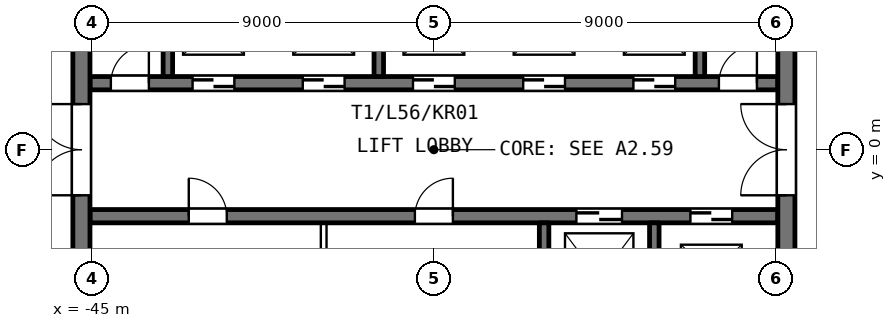
"""IFC4 building model, lengths in metres.
Left out: names, types, materials, properties, quantities, classifications, styles, units other than length and angle.
Written with IfcOpenShell. Run it as: python <this file> out.ifc"""

import sys

from ifc_helpers import new_model, si_unit, direction, frame, frame_2d, origin, place, context, subcontext, project, spatial, rectangle, extrude, element, fill, save


model = new_model("IFC4")
c1 = context("Model", 3, precision=1e-05, world=origin(), true_north=direction((0.0, 1.0)))
c2 = subcontext(c1, "Body", "Model", "MODEL_VIEW")
j1 = project(units=[si_unit("LENGTHUNIT", "METRE"), si_unit("PLANEANGLEUNIT", "RADIAN")], contexts=[c1])
p1 = place(None, origin())
s1 = spatial("IfcSite", under=j1, at=p1, CompositionType="ELEMENT")
p2 = place(p1, origin())
s2 = spatial("IfcBuilding", under=s1, at=p2, CompositionType="ELEMENT")
p3 = place(p2, frame((0.0, 0.0, 236.7)))
s3 = spatial("IfcBuildingStorey", under=s2, at=p3, CompositionType="ELEMENT", Elevation=236.7)
p4 = place(p3, frame((-45.05, -1.75, 0.0), z_axis=(0.0, 0.0, 1.0), x_axis=(1.0, 0.0, 0.0)))
e1 = element("IfcWall", 1, at=p4, inside=s3, PredefinedType="SHEAR", context=c2, shape_type="SweptSolid", body=[
    extrude(rectangle(XDim=18.1, YDim=0.35, at=frame_2d((9.05, 0.0))), origin(), (0.0, 0.0, 1.0), 3.6),
])
p5 = place(p4, frame((12.8, 0.0, 0.0)))
e2 = element("IfcOpeningElement", 2, at=p5, cuts=e1, PredefinedType="OPENING", context=c2, shape_type="SweptSolid", body=[
    extrude(rectangle(XDim=1.2, YDim=2.1, at=frame_2d((0.6, 1.05))), frame((0.0, 0.185, 0.0), z_axis=(0.0, -1.0, 0.0), x_axis=(1.0, 0.0, 0.0)), (0.0, 0.0, 1.0), 0.37),
])
p6 = place(p4, frame((15.8, 0.0, 0.0)))
e3 = element("IfcOpeningElement", 3, at=p6, cuts=e1, PredefinedType="OPENING", context=c2, shape_type="SweptSolid", body=[
    extrude(rectangle(XDim=1.1, YDim=2.1, at=frame_2d((0.55, 1.05))), frame((0.0, 0.185, 0.0), z_axis=(0.0, -1.0, 0.0), x_axis=(1.0, 0.0, 0.0)), (0.0, 0.0, 1.0), 0.37),
])
p7 = place(p4, frame((2.6, 0.0, 0.0)))
e4 = element("IfcOpeningElement", 4, at=p7, cuts=e1, PredefinedType="OPENING", context=c2, shape_type="SweptSolid", body=[
    extrude(rectangle(XDim=1.0, YDim=2.1, at=frame_2d((0.5, 1.05))), frame((0.0, 0.185, 0.0), z_axis=(0.0, -1.0, 0.0), x_axis=(1.0, 0.0, 0.0)), (0.0, 0.0, 1.0), 0.37),
])
p8 = place(p4, frame((8.55, 0.0, 0.0)))
e5 = element("IfcOpeningElement", 5, at=p8, cuts=e1, PredefinedType="OPENING", context=c2, shape_type="SweptSolid", body=[
    extrude(rectangle(XDim=1.0, YDim=2.1, at=frame_2d((0.5, 1.05))), frame((0.0, 0.185, 0.0), z_axis=(0.0, -1.0, 0.0), x_axis=(1.0, 0.0, 0.0)), (0.0, 0.0, 1.0), 0.37),
])
p9 = place(p3, frame((-45.05, 1.75, 0.0), z_axis=(0.0, 0.0, 1.0), x_axis=(1.0, 0.0, 0.0)))
e6 = element("IfcWall", 6, at=p9, inside=s3, PredefinedType="SHEAR", context=c2, shape_type="SweptSolid", body=[
    extrude(rectangle(XDim=18.1, YDim=0.35, at=frame_2d((9.05, 0.0))), origin(), (0.0, 0.0, 1.0), 3.6),
])
p10 = place(p9, frame((0.55, 0.0, 0.0)))
e7 = element("IfcOpeningElement", 7, at=p10, cuts=e6, PredefinedType="OPENING", context=c2, shape_type="SweptSolid", body=[
    extrude(rectangle(XDim=1.0, YDim=2.1, at=frame_2d((0.5, 1.05))), frame((0.0, 0.185, 0.0), z_axis=(0.0, -1.0, 0.0), x_axis=(1.0, 0.0, 0.0)), (0.0, 0.0, 1.0), 0.37),
])
p11 = place(p9, frame((2.7, 0.0, 0.0)))
e8 = element("IfcOpeningElement", 8, at=p11, cuts=e6, PredefinedType="OPENING", context=c2, shape_type="SweptSolid", body=[
    extrude(rectangle(XDim=1.1, YDim=2.1, at=frame_2d((0.55, 1.05))), frame((0.0, 0.185, 0.0), z_axis=(0.0, -1.0, 0.0), x_axis=(1.0, 0.0, 0.0)), (0.0, 0.0, 1.0), 0.37),
])
p12 = place(p9, frame((5.6, 0.0, 0.0)))
e9 = element("IfcOpeningElement", 9, at=p12, cuts=e6, PredefinedType="OPENING", context=c2, shape_type="SweptSolid", body=[
    extrude(rectangle(XDim=1.1, YDim=2.1, at=frame_2d((0.55, 1.05))), frame((0.0, 0.185, 0.0), z_axis=(0.0, -1.0, 0.0), x_axis=(1.0, 0.0, 0.0)), (0.0, 0.0, 1.0), 0.37),
])
p13 = place(p9, frame((8.5, 0.0, 0.0)))
e10 = element("IfcOpeningElement", 10, at=p13, cuts=e6, PredefinedType="OPENING", context=c2, shape_type="SweptSolid", body=[
    extrude(rectangle(XDim=1.1, YDim=2.1, at=frame_2d((0.55, 1.05))), frame((0.0, 0.185, 0.0), z_axis=(0.0, -1.0, 0.0), x_axis=(1.0, 0.0, 0.0)), (0.0, 0.0, 1.0), 0.37),
])
p14 = place(p9, frame((11.4, 0.0, 0.0)))
e11 = element("IfcOpeningElement", 11, at=p14, cuts=e6, PredefinedType="OPENING", context=c2, shape_type="SweptSolid", body=[
    extrude(rectangle(XDim=1.1, YDim=2.1, at=frame_2d((0.55, 1.05))), frame((0.0, 0.185, 0.0), z_axis=(0.0, -1.0, 0.0), x_axis=(1.0, 0.0, 0.0)), (0.0, 0.0, 1.0), 0.37),
])
p15 = place(p9, frame((14.3, 0.0, 0.0)))
e12 = element("IfcOpeningElement", 12, at=p15, cuts=e6, PredefinedType="OPENING", context=c2, shape_type="SweptSolid", body=[
    extrude(rectangle(XDim=1.1, YDim=2.1, at=frame_2d((0.55, 1.05))), frame((0.0, 0.185, 0.0), z_axis=(0.0, -1.0, 0.0), x_axis=(1.0, 0.0, 0.0)), (0.0, 0.0, 1.0), 0.37),
])
p16 = place(p9, frame((16.55, 0.0, 0.0)))
e13 = element("IfcOpeningElement", 13, at=p16, cuts=e6, PredefinedType="OPENING", context=c2, shape_type="SweptSolid", body=[
    extrude(rectangle(XDim=1.0, YDim=2.1, at=frame_2d((0.5, 1.05))), frame((0.0, 0.185, 0.0), z_axis=(0.0, -1.0, 0.0), x_axis=(1.0, 0.0, 0.0)), (0.0, 0.0, 1.0), 0.37),
])
p17 = place(p3, frame((-45.275, -9.5, 0.0), z_axis=(0.0, 0.0, 1.0), x_axis=(0.0, 1.0, 0.0)))
e14 = element("IfcWall", 14, at=p17, inside=s3, PredefinedType="SHEAR", context=c2, shape_type="SweptSolid", body=[
    extrude(rectangle(XDim=19.0, YDim=0.45, at=frame_2d((9.5, 0.0))), origin(), (0.0, 0.0, 1.0), 3.6),
])
p18 = place(p17, frame((8.3, 0.0, 0.0)))
e15 = element("IfcOpeningElement", 15, at=p18, cuts=e14, PredefinedType="OPENING", context=c2, shape_type="SweptSolid", body=[
    extrude(rectangle(XDim=2.4, YDim=2.1, at=frame_2d((1.2, 1.05))), frame((0.0, 0.235, 0.0), z_axis=(0.0, -1.0, 0.0), x_axis=(1.0, 0.0, 0.0)), (0.0, 0.0, 1.0), 0.47),
])
p19 = place(p3, frame((-43.0, 1.925, 0.0), z_axis=(0.0, 0.0, 1.0), x_axis=(0.0, 1.0, 0.0)))
e16 = element("IfcWall", 16, at=p19, inside=s3, PredefinedType="SHEAR", context=c2, shape_type="SweptSolid", body=[
    extrude(rectangle(XDim=2.7, YDim=0.25, at=frame_2d((1.35, 0.0))), origin(), (0.0, 0.0, 1.0), 3.6),
])
p20 = place(p3, frame((-38.9, -4.625, 0.0), z_axis=(0.0, 0.0, 1.0), x_axis=(0.0, 1.0, 0.0)))
e17 = element("IfcWall", 17, at=p20, inside=s3, PredefinedType="PARTITIONING", context=c2, shape_type="SweptSolid", body=[
    extrude(rectangle(XDim=2.7, YDim=0.15, at=frame_2d((1.35, 0.0))), origin(), (0.0, 0.0, 1.0), 3.6),
])
for number, where, z_axis, x_axis in (
    (18, (-37.45, 1.925, 0.0), (0.0, 0.0, 1.0), (0.0, 1.0, 0.0)),
    (19, (-33.1, -4.625, 0.0), (0.0, 0.0, 1.0), (0.0, 1.0, 0.0)),
    (20, (-30.2, -4.625, 0.0), (0.0, 0.0, 1.0), (0.0, 1.0, 0.0)),
):
    element("IfcWall", number, at=place(p3, frame(where, z_axis=z_axis, x_axis=x_axis)), inside=s3, PredefinedType="SHEAR", context=c2, shape_type="SweptSolid", body=[
        extrude(rectangle(XDim=2.7, YDim=0.25, at=frame_2d((1.35, 0.0))), origin(), (0.0, 0.0, 1.0), 3.6),
    ])
p21 = place(p3, frame((-29.0, 1.925, 0.0), z_axis=(0.0, 0.0, 1.0), x_axis=(0.0, 1.0, 0.0)))
e21 = element("IfcWall", 21, at=p21, inside=s3, PredefinedType="SHEAR", context=c2, shape_type="SweptSolid", body=[
    extrude(rectangle(XDim=2.95, YDim=0.25, at=frame_2d((1.475, 0.0))), origin(), (0.0, 0.0, 1.0), 3.6),
])
p22 = place(p3, frame((-26.725, -9.5, 0.0), z_axis=(0.0, 0.0, 1.0), x_axis=(0.0, 1.0, 0.0)))
e22 = element("IfcWall", 22, at=p22, inside=s3, PredefinedType="SHEAR", context=c2, shape_type="SweptSolid", body=[
    extrude(rectangle(XDim=19.0, YDim=0.45, at=frame_2d((9.5, 0.0))), origin(), (0.0, 0.0, 1.0), 3.6),
])
p23 = place(p22, frame((8.3, 0.0, 0.0)))
e23 = element("IfcOpeningElement", 23, at=p23, cuts=e22, PredefinedType="OPENING", context=c2, shape_type="SweptSolid", body=[
    extrude(rectangle(XDim=2.4, YDim=2.1, at=frame_2d((1.2, 1.05))), frame((0.0, 0.235, 0.0), z_axis=(0.0, -1.0, 0.0), x_axis=(1.0, 0.0, 0.0)), (0.0, 0.0, 1.0), 0.47),
])
p24 = place(p18, origin())
e24 = element("IfcDoor", 24, at=p24, inside=s3, OperationType="DOUBLE_DOOR_SINGLE_SWING", PredefinedType="DOOR", context=c2, shape_type="SweptSolid", body=[
    extrude(rectangle(XDim=2.4, YDim=2.1, at=frame_2d((1.2, 1.05))), frame((0.0, 0.025, 0.0), z_axis=(0.0, -1.0, 0.0), x_axis=(1.0, 0.0, 0.0)), (0.0, 0.0, 1.0), 0.05),
])
fill(e15, e24)
p25 = place(p23, origin())
e25 = element("IfcDoor", 25, at=p25, inside=s3, OperationType="DOUBLE_DOOR_SINGLE_SWING", PredefinedType="DOOR", context=c2, shape_type="SweptSolid", body=[
    extrude(rectangle(XDim=2.4, YDim=2.1, at=frame_2d((1.2, 1.05))), frame((0.0, 0.025, 0.0), z_axis=(0.0, -1.0, 0.0), x_axis=(1.0, 0.0, 0.0)), (0.0, 0.0, 1.0), 0.05),
])
fill(e23, e25)
p26 = place(p10, origin())
e26 = element("IfcDoor", 26, at=p26, inside=s3, OperationType="SINGLE_SWING_RIGHT", PredefinedType="DOOR", context=c2, shape_type="SweptSolid", body=[
    extrude(rectangle(XDim=1.0, YDim=2.1, at=frame_2d((0.5, 1.05))), frame((0.0, 0.025, 0.0), z_axis=(0.0, -1.0, 0.0), x_axis=(1.0, 0.0, 0.0)), (0.0, 0.0, 1.0), 0.05),
])
fill(e7, e26)
p27 = place(p11, origin())
e27 = element("IfcDoor", 27, at=p27, inside=s3, OperationType="SLIDING_TO_LEFT", PredefinedType="DOOR", context=c2, shape_type="SweptSolid", body=[
    extrude(rectangle(XDim=1.1, YDim=2.1, at=frame_2d((0.55, 1.05))), frame((0.0, 0.025, 0.0), z_axis=(0.0, -1.0, 0.0), x_axis=(1.0, 0.0, 0.0)), (0.0, 0.0, 1.0), 0.05),
])
fill(e8, e27)
p28 = place(p12, origin())
e28 = element("IfcDoor", 28, at=p28, inside=s3, OperationType="SLIDING_TO_LEFT", PredefinedType="DOOR", context=c2, shape_type="SweptSolid", body=[
    extrude(rectangle(XDim=1.1, YDim=2.1, at=frame_2d((0.55, 1.05))), frame((0.0, 0.025, 0.0), z_axis=(0.0, -1.0, 0.0), x_axis=(1.0, 0.0, 0.0)), (0.0, 0.0, 1.0), 0.05),
])
fill(e9, e28)
p29 = place(p13, origin())
e29 = element("IfcDoor", 29, at=p29, inside=s3, OperationType="SLIDING_TO_LEFT", PredefinedType="DOOR", context=c2, shape_type="SweptSolid", body=[
    extrude(rectangle(XDim=1.1, YDim=2.1, at=frame_2d((0.55, 1.05))), frame((0.0, 0.025, 0.0), z_axis=(0.0, -1.0, 0.0), x_axis=(1.0, 0.0, 0.0)), (0.0, 0.0, 1.0), 0.05),
])
fill(e10, e29)
p30 = place(p14, origin())
e30 = element("IfcDoor", 30, at=p30, inside=s3, OperationType="SLIDING_TO_LEFT", PredefinedType="DOOR", context=c2, shape_type="SweptSolid", body=[
    extrude(rectangle(XDim=1.1, YDim=2.1, at=frame_2d((0.55, 1.05))), frame((0.0, 0.025, 0.0), z_axis=(0.0, -1.0, 0.0), x_axis=(1.0, 0.0, 0.0)), (0.0, 0.0, 1.0), 0.05),
])
fill(e11, e30)
p31 = place(p15, origin())
e31 = element("IfcDoor", 31, at=p31, inside=s3, OperationType="SLIDING_TO_LEFT", PredefinedType="DOOR", context=c2, shape_type="SweptSolid", body=[
    extrude(rectangle(XDim=1.1, YDim=2.1, at=frame_2d((0.55, 1.05))), frame((0.0, 0.025, 0.0), z_axis=(0.0, -1.0, 0.0), x_axis=(1.0, 0.0, 0.0)), (0.0, 0.0, 1.0), 0.05),
])
fill(e12, e31)
p32 = place(p16, origin())
e32 = element("IfcDoor", 32, at=p32, inside=s3, OperationType="SINGLE_SWING_RIGHT", PredefinedType="DOOR", context=c2, shape_type="SweptSolid", body=[
    extrude(rectangle(XDim=1.0, YDim=2.1, at=frame_2d((0.5, 1.05))), frame((0.0, 0.025, 0.0), z_axis=(0.0, -1.0, 0.0), x_axis=(1.0, 0.0, 0.0)), (0.0, 0.0, 1.0), 0.05),
])
fill(e13, e32)
p33 = place(p5, origin())
e33 = element("IfcDoor", 33, at=p33, inside=s3, OperationType="SLIDING_TO_LEFT", PredefinedType="DOOR", context=c2, shape_type="SweptSolid", body=[
    extrude(rectangle(XDim=1.2, YDim=2.1, at=frame_2d((0.6, 1.05))), frame((0.0, 0.025, 0.0), z_axis=(0.0, -1.0, 0.0), x_axis=(1.0, 0.0, 0.0)), (0.0, 0.0, 1.0), 0.05),
])
fill(e2, e33)
p34 = place(p6, origin())
e34 = element("IfcDoor", 34, at=p34, inside=s3, OperationType="SLIDING_TO_LEFT", PredefinedType="DOOR", context=c2, shape_type="SweptSolid", body=[
    extrude(rectangle(XDim=1.1, YDim=2.1, at=frame_2d((0.55, 1.05))), frame((0.0, 0.025, 0.0), z_axis=(0.0, -1.0, 0.0), x_axis=(1.0, 0.0, 0.0)), (0.0, 0.0, 1.0), 0.05),
])
fill(e3, e34)
p35 = place(p7, origin())
e35 = element("IfcDoor", 35, at=p35, inside=s3, OperationType="SINGLE_SWING_LEFT", PredefinedType="DOOR", context=c2, shape_type="SweptSolid", body=[
    extrude(rectangle(XDim=1.0, YDim=2.1, at=frame_2d((0.5, 1.05))), frame((0.0, 0.025, 0.0), z_axis=(0.0, -1.0, 0.0), x_axis=(1.0, 0.0, 0.0)), (0.0, 0.0, 1.0), 0.05),
])
fill(e4, e35)
p36 = place(p8, origin())
e36 = element("IfcDoor", 36, at=p36, inside=s3, OperationType="SINGLE_SWING_RIGHT", PredefinedType="DOOR", context=c2, shape_type="SweptSolid", body=[
    extrude(rectangle(XDim=1.0, YDim=2.1, at=frame_2d((0.5, 1.05))), frame((0.0, 0.025, 0.0), z_axis=(0.0, -1.0, 0.0), x_axis=(1.0, 0.0, 0.0)), (0.0, 0.0, 1.0), 0.05),
])
fill(e5, e36)
save(model, sys.argv[1])
